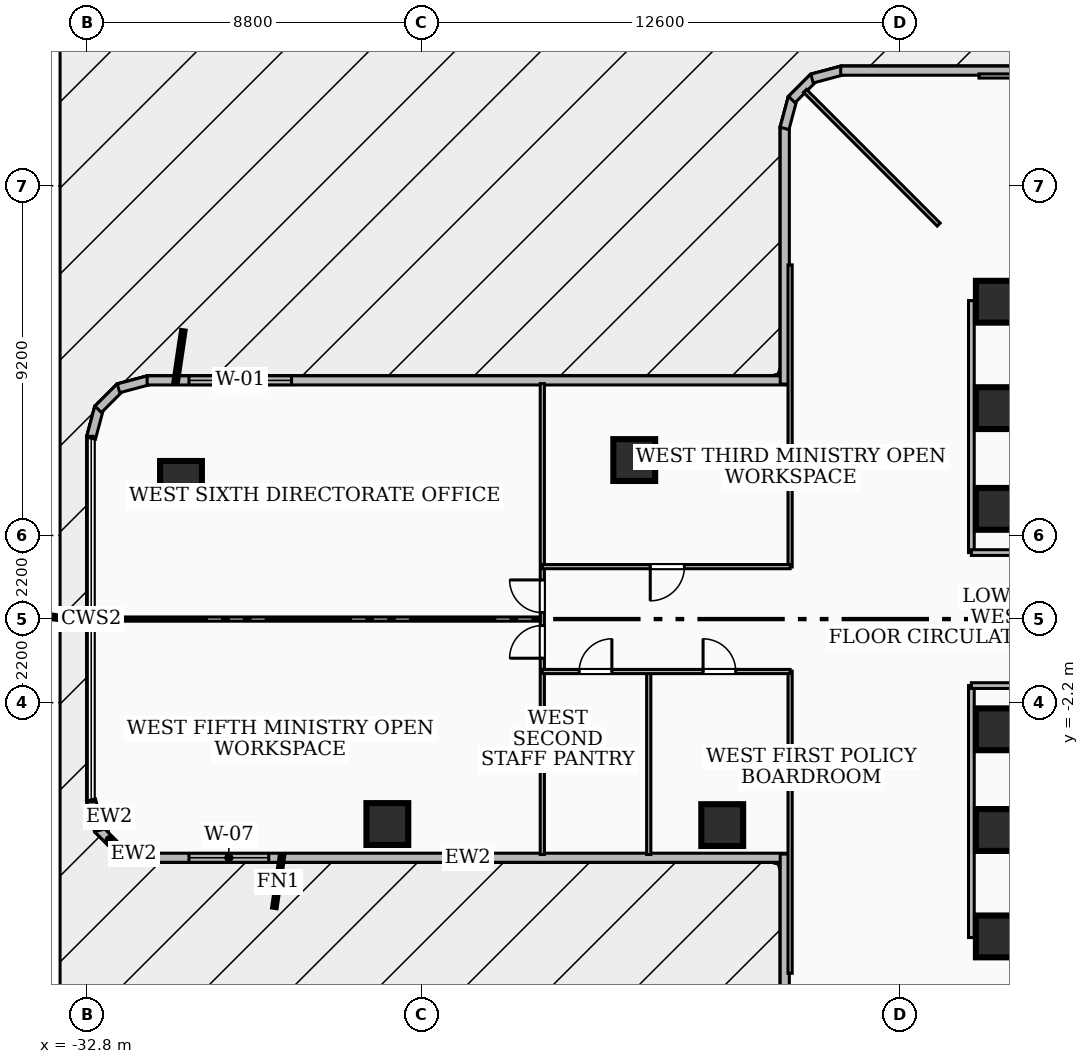
"""IFC4 building model, lengths in metres.
Left out: names, types, materials, properties, quantities, classifications, styles, units other than length and angle.
Written with IfcOpenShell. Run it as: python <this file> out.ifc"""

import sys

from ifc_helpers import new_model, si_unit, direction, frame, frame_2d, origin, origin_2d, place, context, subcontext, project, spatial, rectangle, extrude, element, fill, save


model = new_model("IFC4")
c1 = context("Model", 3, precision=1e-05, world=origin(), true_north=direction((0.0, 1.0)))
c2 = subcontext(c1, "Body", "Model", "MODEL_VIEW")
j1 = project(units=[si_unit("LENGTHUNIT", "METRE"), si_unit("PLANEANGLEUNIT", "RADIAN")], contexts=[c1])
p1 = place(None, origin())
s1 = spatial("IfcSite", under=j1, at=p1, CompositionType="ELEMENT")
p2 = place(p1, origin())
s2 = spatial("IfcBuilding", under=s1, at=p2, CompositionType="ELEMENT")
p3 = place(p2, frame((0.0, 0.0, 24.48)))
s3 = spatial("IfcBuildingStorey", under=s2, at=p3, CompositionType="ELEMENT", Elevation=24.48)
for number, where, z_axis, x_axis in (
    (1, (-8.78, 8.585, 0.0), (0.0, 0.0, 1.0), (1.0, 0.0, 0.0)),
    (2, (8.78, -8.585, 0.0), (0.0, 0.0, 1.0), (-1.0, 0.0, 0.0)),
):
    element("IfcWall", number, at=place(p3, frame(where, z_axis=z_axis, x_axis=x_axis)), inside=s3, PredefinedType="SHEAR", context=c2, shape_type="SweptSolid", body=[
        extrude(rectangle(XDim=17.56, YDim=0.55, at=frame_2d((8.78, 0.0))), origin(), (0.0, 0.0, 1.0), 3.34),
    ])
for number, where, z_axis, x_axis in (
    (3, (-8.85, -5.55, 0.0), (0.0, 0.0, 1.0), (1.0, 0.0, 0.0)),
    (4, (-8.85, -2.9, 0.0), (0.0, 0.0, 1.0), (1.0, 0.0, 0.0)),
    (5, (-8.85, 2.9, 0.0), (0.0, 0.0, 1.0), (1.0, 0.0, 0.0)),
    (6, (-8.85, 5.55, 0.0), (0.0, 0.0, 1.0), (1.0, 0.0, 0.0)),
    (7, (-8.85, 8.35, 0.0), (0.0, 0.0, 1.0), (1.0, 0.0, 0.0)),
    (8, (-8.85, -8.35, 0.0), (0.0, 0.0, 1.0), (1.0, 0.0, 0.0)),
    (9, (-18.391, 4.184, 0.0), (0.0, 0.0, 1.0), (1.0, 0.0, 0.0)),
    (10, (-16.076, -5.421, 0.0), (0.0, 0.0, 1.0), (1.0, 0.0, 0.0)),
    (11, (-30.318, 3.609, 0.0), (0.0, 0.0, 1.0), (1.0, 0.0, 0.0)),
    (12, (-24.888, -5.393, 0.0), (0.0, 0.0, 1.0), (1.0, 0.0, 0.0)),
):
    element("IfcColumn", number, at=place(p3, frame(where, z_axis=z_axis, x_axis=x_axis)), inside=s3, PredefinedType="COLUMN", context=c2, shape_type="SweptSolid", body=[
        extrude(rectangle(XDim=1.1, YDim=1.1, at=origin_2d()), origin(), (0.0, 0.0, 1.0), 3.6),
    ])
p4 = place(p3, frame((-14.334, -6.28, 0.0), z_axis=(0.0, 0.0, 1.0), x_axis=(-1.0, 0.0, 0.0)))
e13 = element("IfcWall", 13, at=p4, inside=s3, PredefinedType="SOLIDWALL", context=c2, shape_type="SweptSolid", body=[
    extrude(rectangle(XDim=16.875, YDim=0.24, at=frame_2d((8.438, 0.0))), origin(), (0.0, 0.0, 1.0), 3.34),
])
p5 = place(p4, frame((13.675, 0.0, 0.85)))
e14 = element("IfcOpeningElement", 14, at=p5, cuts=e13, PredefinedType="OPENING", context=c2, shape_type="SweptSolid", body=[
    extrude(rectangle(XDim=2.1, YDim=1.8, at=frame_2d((1.05, 0.9))), frame((0.0, 0.13, 0.0), z_axis=(0.0, -1.0, 0.0), x_axis=(1.0, 0.0, 0.0)), (0.0, 0.0, 1.0), 0.26),
])
p6 = place(p3, frame((-31.16, -6.286, 0.0), z_axis=(0.0, 0.0, 1.0), x_axis=(-0.966234939601, 0.25766265056, 0.0)))
e15 = element("IfcWall", 15, at=p6, inside=s3, PredefinedType="SOLIDWALL", context=c2, shape_type="SweptSolid", body=[
    extrude(rectangle(XDim=0.83, YDim=0.24, at=frame_2d((0.415, 0.0))), origin(), (0.0, 0.0, 1.0), 3.34),
])
p7 = place(p3, frame((-31.92, -6.096, 0.0), z_axis=(0.0, 0.0, 1.0), x_axis=(-0.707256607812, 0.706956922808, 0.0)))
e16 = element("IfcWall", 16, at=p7, inside=s3, PredefinedType="SOLIDWALL", context=c2, shape_type="SweptSolid", body=[
    extrude(rectangle(XDim=0.815, YDim=0.24, at=frame_2d((0.407, 0.0))), origin(), (0.0, 0.0, 1.0), 3.34),
])
for number, where, z_axis, x_axis in (
    (17, (-32.472, -5.562, 0.0), (0.0, 0.0, 1.0), (-0.258, 0.966, 0.0)),
    (18, (-32.686, 4.76, 0.0), (0.0, 0.0, 1.0), (0.258, 0.966, 0.0)),
):
    element("IfcWall", number, at=place(p3, frame(where, z_axis=z_axis, x_axis=x_axis)), inside=s3, PredefinedType="SOLIDWALL", context=c2, shape_type="SweptSolid", body=[
        extrude(rectangle(XDim=0.83, YDim=0.24, at=frame_2d((0.415, 0.0))), origin(), (0.0, 0.0, 1.0), 3.34),
    ])
p8 = place(p3, frame((-32.496, 5.52, 0.0), z_axis=(0.0, 0.0, 1.0), x_axis=(0.707256607812, 0.706956922808, 0.0)))
e19 = element("IfcWall", 19, at=p8, inside=s3, PredefinedType="SOLIDWALL", context=c2, shape_type="SweptSolid", body=[
    extrude(rectangle(XDim=0.815, YDim=0.24, at=frame_2d((0.407, 0.0))), origin(), (0.0, 0.0, 1.0), 3.34),
])
p9 = place(p3, frame((-31.962, 6.072, 0.0), z_axis=(0.0, 0.0, 1.0), x_axis=(0.966234939601, 0.25766265056, 0.0)))
e20 = element("IfcWall", 20, at=p9, inside=s3, PredefinedType="SOLIDWALL", context=c2, shape_type="SweptSolid", body=[
    extrude(rectangle(XDim=0.83, YDim=0.24, at=frame_2d((0.415, 0.0))), origin(), (0.0, 0.0, 1.0), 3.34),
])
p10 = place(p3, frame((-31.209, 6.28, 0.0), z_axis=(0.0, 0.0, 1.0), x_axis=(1.0, 0.0, 0.0)))
e21 = element("IfcWall", 21, at=p10, inside=s3, PredefinedType="SOLIDWALL", context=c2, shape_type="SweptSolid", body=[
    extrude(rectangle(XDim=16.875, YDim=0.24, at=frame_2d((8.438, 0.0))), origin(), (0.0, 0.0, 1.0), 3.34),
])
p11 = place(p10, frame((1.1, 0.0, 0.85)))
e22 = element("IfcOpeningElement", 22, at=p11, cuts=e21, PredefinedType="OPENING", context=c2, shape_type="SweptSolid", body=[
    extrude(rectangle(XDim=2.7, YDim=2.1, at=frame_2d((1.35, 1.05))), frame((0.0, 0.13, 0.0), z_axis=(0.0, -1.0, 0.0), x_axis=(1.0, 0.0, 0.0)), (0.0, 0.0, 1.0), 0.26),
])
p12 = place(p3, frame((-14.43, 6.184, 0.0), z_axis=(0.0, 0.0, 1.0), x_axis=(0.0, 1.0, 0.0)))
e23 = element("IfcWall", 23, at=p12, inside=s3, PredefinedType="SOLIDWALL", context=c2, shape_type="SweptSolid", body=[
    extrude(rectangle(XDim=6.775, YDim=0.24, at=frame_2d((3.387, 0.0))), origin(), (0.0, 0.0, 1.0), 3.34),
])
p13 = place(p3, frame((-14.436, 12.91, 0.0), z_axis=(0.0, 0.0, 1.0), x_axis=(0.257937227116, 0.966161677396, 0.0)))
e24 = element("IfcWall", 24, at=p13, inside=s3, PredefinedType="SOLIDWALL", context=c2, shape_type="SweptSolid", body=[
    extrude(rectangle(XDim=0.83, YDim=0.24, at=frame_2d((0.415, 0.0))), origin(), (0.0, 0.0, 1.0), 3.34),
])
p14 = place(p3, frame((-14.246, 13.67, 0.0), z_axis=(0.0, 0.0, 1.0), x_axis=(0.707106781187, 0.707106781187, 0.0)))
e25 = element("IfcWall", 25, at=p14, inside=s3, PredefinedType="SOLIDWALL", context=c2, shape_type="SweptSolid", body=[
    extrude(rectangle(XDim=0.815, YDim=0.24, at=frame_2d((0.407, 0.0))), origin(), (0.0, 0.0, 1.0), 3.34),
])
p15 = place(p3, frame((-13.712, 14.222, 0.0), z_axis=(0.0, 0.0, 1.0), x_axis=(0.966161677396, 0.257937227116, 0.0)))
e26 = element("IfcWall", 26, at=p15, inside=s3, PredefinedType="SOLIDWALL", context=c2, shape_type="SweptSolid", body=[
    extrude(rectangle(XDim=0.83, YDim=0.24, at=frame_2d((0.415, 0.0))), origin(), (0.0, 0.0, 1.0), 3.34),
])
p16 = place(p3, frame((-12.959, 14.43, 0.0), z_axis=(0.0, 0.0, 1.0), x_axis=(1.0, 0.0, 0.0)))
e27 = element("IfcWall", 27, at=p16, inside=s3, PredefinedType="SOLIDWALL", context=c2, shape_type="SweptSolid", body=[
    extrude(rectangle(XDim=6.775, YDim=0.24, at=frame_2d((3.387, 0.0))), origin(), (0.0, 0.0, 1.0), 2.421),
])
p17 = place(p3, frame((-14.43, -12.959, 0.0), z_axis=(0.0, 0.0, 1.0), x_axis=(0.0, 1.0, 0.0)))
e28 = element("IfcWall", 28, at=p17, inside=s3, PredefinedType="SOLIDWALL", context=c2, shape_type="SweptSolid", body=[
    extrude(rectangle(XDim=6.775, YDim=0.24, at=frame_2d((3.387, 0.0))), origin(), (0.0, 0.0, 1.0), 3.34),
])
p18 = place(p3, frame((-9.52, 1.75, 0.0), z_axis=(0.0, 0.0, 1.0), x_axis=(0.0, 1.0, 0.0)))
e29 = element("IfcWall", 29, at=p18, inside=s3, PredefinedType="PARTITIONING", context=c2, shape_type="SweptSolid", body=[
    extrude(rectangle(XDim=6.63, YDim=0.15, at=frame_2d((3.315, 0.0))), origin(), (0.0, 0.0, 1.0), 2.421),
])
p19 = place(p3, frame((-7.85, 1.75, 0.0), z_axis=(0.0, 0.0, 1.0), x_axis=(-1.0, 0.0, 0.0)))
e30 = element("IfcWall", 30, at=p19, inside=s3, PredefinedType="PARTITIONING", context=c2, shape_type="SweptSolid", body=[
    extrude(rectangle(XDim=1.67, YDim=0.15, at=frame_2d((0.835, 0.0))), origin(), (0.0, 0.0, 1.0), 2.405),
])
p20 = place(p3, frame((-9.52, -8.38, 0.0), z_axis=(0.0, 0.0, 1.0), x_axis=(0.0, 1.0, 0.0)))
e31 = element("IfcWall", 31, at=p20, inside=s3, PredefinedType="PARTITIONING", context=c2, shape_type="SweptSolid", body=[
    extrude(rectangle(XDim=6.63, YDim=0.15, at=frame_2d((3.315, 0.0))), origin(), (0.0, 0.0, 1.0), 2.421),
])
p21 = place(p3, frame((-7.85, -1.75, 0.0), z_axis=(0.0, 0.0, 1.0), x_axis=(-1.0, 0.0, 0.0)))
e32 = element("IfcWall", 32, at=p21, inside=s3, PredefinedType="PARTITIONING", context=c2, shape_type="SweptSolid", body=[
    extrude(rectangle(XDim=1.67, YDim=0.15, at=frame_2d((0.835, 0.0))), origin(), (0.0, 0.0, 1.0), 2.405),
])
p22 = place(p3, frame((-10.38, 10.38, 0.0), z_axis=(0.0, 0.0, 1.0), x_axis=(-0.707106781187, 0.707106781187, 0.0)))
e33 = element("IfcWall", 33, at=p22, inside=s3, PredefinedType="PARTITIONING", context=c2, shape_type="SweptSolid", body=[
    extrude(rectangle(XDim=4.975, YDim=0.11, at=frame_2d((2.488, 0.0))), origin(), (0.0, 0.0, 1.0), 3.34),
])
for number, where, z_axis, x_axis in (
    (34, (-1.37, 14.29, 0.0), (0.0, 0.0, 1.0), (-1.0, 0.0, 0.0)),
    (35, (-14.29, -1.37, 0.0), (0.0, 0.0, 1.0), (0.0, -1.0, 0.0)),
    (36, (-14.29, 9.32, 0.0), (0.0, 0.0, 1.0), (0.0, -1.0, 0.0)),
):
    element("IfcWall", number, at=place(p3, frame(where, z_axis=z_axis, x_axis=x_axis)), inside=s3, PredefinedType="PARTITIONING", context=c2, shape_type="SweptSolid", body=[
        extrude(rectangle(XDim=7.95, YDim=0.11, at=frame_2d((3.975, 0.0))), origin(), (0.0, 0.0, 1.0), 2.421),
    ])
p23 = place(p3, frame((-18.01, -1.4, 0.0), z_axis=(0.0, 0.0, 1.0), x_axis=(0.0, -1.0, 0.0)))
e37 = element("IfcWall", 37, at=p23, inside=s3, PredefinedType="PARTITIONING", context=c2, shape_type="SweptSolid", body=[
    extrude(rectangle(XDim=4.795, YDim=0.11, at=frame_2d((2.397, 0.0))), origin(), (0.0, 0.0, 1.0), 2.421),
])
p24 = place(p3, frame((-20.81, -1.38, 0.0), z_axis=(0.0, 0.0, 1.0), x_axis=(1.0, 0.0, 0.0)))
e38 = element("IfcWall", 38, at=p24, inside=s3, PredefinedType="PARTITIONING", context=c2, shape_type="SweptSolid", body=[
    extrude(rectangle(XDim=6.52, YDim=0.11, at=frame_2d((3.26, 0.0))), origin(), (0.0, 0.0, 1.0), 2.869),
])
p25 = place(p24, frame((4.23, 0.0, 0.0)))
e39 = element("IfcOpeningElement", 39, at=p25, cuts=e38, PredefinedType="OPENING", context=c2, shape_type="SweptSolid", body=[
    extrude(rectangle(XDim=0.86, YDim=2.04, at=frame_2d((0.43, 1.02))), frame((0.0, 0.065, 0.0), z_axis=(0.0, -1.0, 0.0), x_axis=(1.0, 0.0, 0.0)), (0.0, 0.0, 1.0), 0.13),
])
p26 = place(p24, frame((0.97, 0.0, 0.0)))
e40 = element("IfcOpeningElement", 40, at=p26, cuts=e38, PredefinedType="OPENING", context=c2, shape_type="SweptSolid", body=[
    extrude(rectangle(XDim=0.86, YDim=2.04, at=frame_2d((0.43, 1.02))), frame((0.0, 0.065, 0.0), z_axis=(0.0, -1.0, 0.0), x_axis=(1.0, 0.0, 0.0)), (0.0, 0.0, 1.0), 0.13),
])
p27 = place(p3, frame((-14.29, 1.38, 0.0), z_axis=(0.0, 0.0, 1.0), x_axis=(-1.0, 0.0, 0.0)))
e41 = element("IfcWall", 41, at=p27, inside=s3, PredefinedType="PARTITIONING", context=c2, shape_type="SweptSolid", body=[
    extrude(rectangle(XDim=6.52, YDim=0.11, at=frame_2d((3.26, 0.0))), origin(), (0.0, 0.0, 1.0), 2.869),
])
p28 = place(p27, frame((2.78, 0.0, 0.0)))
e42 = element("IfcOpeningElement", 42, at=p28, cuts=e41, PredefinedType="OPENING", context=c2, shape_type="SweptSolid", body=[
    extrude(rectangle(XDim=0.9, YDim=2.06, at=frame_2d((0.45, 1.03))), frame((0.0, 0.065, 0.0), z_axis=(0.0, -1.0, 0.0), x_axis=(1.0, 0.0, 0.0)), (0.0, 0.0, 1.0), 0.13),
])
p29 = place(p3, frame((-20.87, 0.0, 0.0), z_axis=(0.0, 0.0, 1.0), x_axis=(-1.0, 0.0, 0.0)))
e43 = element("IfcWall", 43, at=p29, inside=s3, PredefinedType="PARTITIONING", context=c2, shape_type="SweptSolid", body=[
    extrude(rectangle(XDim=11.725, YDim=0.11, at=frame_2d((5.862, 0.0))), origin(), (0.0, 0.0, 1.0), 2.72),
])
p30 = place(p3, frame((-20.81, -6.195, 0.0), z_axis=(0.0, 0.0, 1.0), x_axis=(0.0, 1.0, 0.0)))
e44 = element("IfcWall", 44, at=p30, inside=s3, PredefinedType="PARTITIONING", context=c2, shape_type="SweptSolid", body=[
    extrude(rectangle(XDim=12.39, YDim=0.11, at=frame_2d((6.195, 0.0))), origin(), (0.0, 0.0, 1.0), 2.421),
])
p31 = place(p30, frame((6.365, 0.0, 0.0)))
e45 = element("IfcOpeningElement", 45, at=p31, cuts=e44, PredefinedType="OPENING", context=c2, shape_type="SweptSolid", body=[
    extrude(rectangle(XDim=0.86, YDim=2.04, at=frame_2d((0.43, 1.02))), frame((0.0, 0.065, 0.0), z_axis=(0.0, -1.0, 0.0), x_axis=(1.0, 0.0, 0.0)), (0.0, 0.0, 1.0), 0.13),
])
p32 = place(p30, frame((5.165, 0.0, 0.0)))
e46 = element("IfcOpeningElement", 46, at=p32, cuts=e44, PredefinedType="OPENING", context=c2, shape_type="SweptSolid", body=[
    extrude(rectangle(XDim=0.86, YDim=2.04, at=frame_2d((0.43, 1.02))), frame((0.0, 0.065, 0.0), z_axis=(0.0, -1.0, 0.0), x_axis=(1.0, 0.0, 0.0)), (0.0, 0.0, 1.0), 0.13),
])
p33 = place(p5, origin())
e47 = element("IfcWindow", 47, at=p33, inside=s3, PartitioningType="SINGLE_PANEL", PredefinedType="WINDOW", context=c2, shape_type="SweptSolid", body=[
    extrude(rectangle(XDim=2.1, YDim=1.8, at=frame_2d((1.05, 0.9))), frame((0.0, 0.03, 0.0), z_axis=(0.0, -1.0, 0.0), x_axis=(1.0, 0.0, 0.0)), (0.0, 0.0, 1.0), 0.06),
])
fill(e14, e47)
p34 = place(p11, origin())
e48 = element("IfcWindow", 48, at=p34, inside=s3, PartitioningType="SINGLE_PANEL", PredefinedType="WINDOW", context=c2, shape_type="SweptSolid", body=[
    extrude(rectangle(XDim=2.7, YDim=2.1, at=frame_2d((1.35, 1.05))), frame((0.0, 0.03, 0.0), z_axis=(0.0, -1.0, 0.0), x_axis=(1.0, 0.0, 0.0)), (0.0, 0.0, 1.0), 0.06),
])
fill(e22, e48)
p35 = place(p25, origin())
e49 = element("IfcDoor", 49, at=p35, inside=s3, OperationType="SINGLE_SWING_LEFT", PredefinedType="DOOR", context=c2, shape_type="SweptSolid", body=[
    extrude(rectangle(XDim=0.86, YDim=2.04, at=frame_2d((0.43, 1.02))), frame((0.0, 0.025, 0.0), z_axis=(0.0, -1.0, 0.0), x_axis=(1.0, 0.0, 0.0)), (0.0, 0.0, 1.0), 0.05),
])
fill(e39, e49)
p36 = place(p26, origin())
e50 = element("IfcDoor", 50, at=p36, inside=s3, OperationType="SINGLE_SWING_RIGHT", PredefinedType="DOOR", context=c2, shape_type="SweptSolid", body=[
    extrude(rectangle(XDim=0.86, YDim=2.04, at=frame_2d((0.43, 1.02))), frame((0.0, 0.025, 0.0), z_axis=(0.0, -1.0, 0.0), x_axis=(1.0, 0.0, 0.0)), (0.0, 0.0, 1.0), 0.05),
])
fill(e40, e50)
p37 = place(p28, origin())
e51 = element("IfcDoor", 51, at=p37, inside=s3, OperationType="SINGLE_SWING_RIGHT", PredefinedType="DOOR", context=c2, shape_type="SweptSolid", body=[
    extrude(rectangle(XDim=0.9, YDim=2.06, at=frame_2d((0.45, 1.03))), frame((0.0, 0.025, 0.0), z_axis=(0.0, -1.0, 0.0), x_axis=(1.0, 0.0, 0.0)), (0.0, 0.0, 1.0), 0.05),
])
fill(e42, e51)
p38 = place(p31, origin())
e52 = element("IfcDoor", 52, at=p38, inside=s3, OperationType="SINGLE_SWING_RIGHT", PredefinedType="DOOR", context=c2, shape_type="SweptSolid", body=[
    extrude(rectangle(XDim=0.86, YDim=2.04, at=frame_2d((0.43, 1.02))), frame((0.0, 0.025, 0.0), z_axis=(0.0, -1.0, 0.0), x_axis=(1.0, 0.0, 0.0)), (0.0, 0.0, 1.0), 0.05),
])
fill(e45, e52)
p39 = place(p32, origin())
e53 = element("IfcDoor", 53, at=p39, inside=s3, OperationType="SINGLE_SWING_LEFT", PredefinedType="DOOR", context=c2, shape_type="SweptSolid", body=[
    extrude(rectangle(XDim=0.86, YDim=2.04, at=frame_2d((0.43, 1.02))), frame((0.0, 0.025, 0.0), z_axis=(0.0, -1.0, 0.0), x_axis=(1.0, 0.0, 0.0)), (0.0, 0.0, 1.0), 0.05),
])
fill(e46, e53)
save(model, sys.argv[1])
